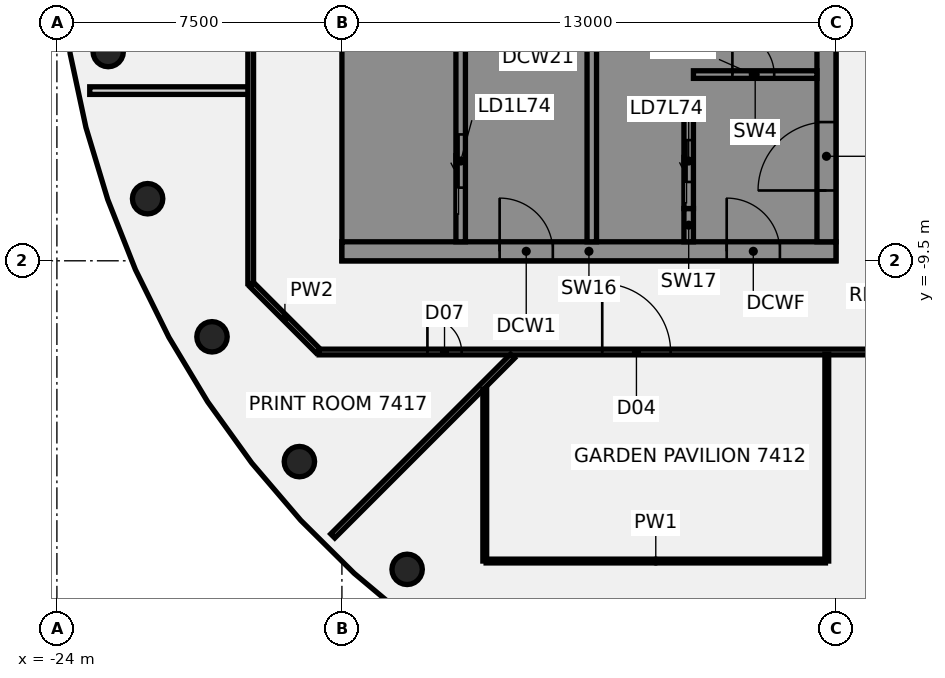
"""IFC4 building model, lengths in metres.
Left out: names, types, materials, properties, quantities, classifications, styles, units other than length and angle.
Written with IfcOpenShell. Run it as: python <this file> out.ifc"""

import sys

from ifc_helpers import new_model, si_unit, direction, frame, frame_2d, origin, origin_2d, place, context, subcontext, project, spatial, polyline, rectangle, circle, outline, extrude, element, fill, save


model = new_model("IFC4")
c1 = context("Model", 3, precision=1e-05, world=origin(), true_north=direction((0.0, 1.0)))
c2 = subcontext(c1, "Body", "Model", "MODEL_VIEW")
j1 = project(units=[si_unit("LENGTHUNIT", "METRE"), si_unit("PLANEANGLEUNIT", "RADIAN")], contexts=[c1])
p1 = place(None, origin())
s1 = spatial("IfcSite", under=j1, at=p1, CompositionType="ELEMENT")
p2 = place(p1, origin())
s2 = spatial("IfcBuilding", under=s1, at=p2, CompositionType="ELEMENT")
p3 = place(p2, frame((0.0, 0.0, 299.4)))
s3 = spatial("IfcBuildingStorey", under=s2, at=p3, CompositionType="ELEMENT", Elevation=299.4)
for number, where, z_axis, x_axis in (
    (1, (-22.651, -3.994, -0.25), (0.0, 0.0, 1.0), (1.0, 0.0, 0.0)),
    (2, (-21.613, -7.866, -0.25), (0.0, 0.0, 1.0), (1.0, 0.0, 0.0)),
    (3, (-19.919, -11.5, -0.25), (0.0, 0.0, 1.0), (1.0, 0.0, 0.0)),
    (4, (-17.619, -14.784, -0.25), (0.0, 0.0, 1.0), (1.0, 0.0, 0.0)),
    (5, (-14.784, -17.619, -0.25), (0.0, 0.0, 1.0), (1.0, 0.0, 0.0)),
):
    element("IfcColumn", number, at=place(p3, frame(where, z_axis=z_axis, x_axis=x_axis)), inside=s3, PredefinedType="COLUMN", context=c2, shape_type="SweptSolid", body=[
        extrude(circle(Radius=0.4, at=origin_2d()), origin(), (0.0, 0.0, 1.0), 6.07),
    ])
p4 = place(p3, frame((-18.872, -10.128, 0.0), z_axis=(0.0, 0.0, 1.0), x_axis=(0.707106781187, -0.707106781187, 0.0)))
e6 = element("IfcWall", 6, at=p4, inside=s3, PredefinedType="PARTITIONING", context=c2, shape_type="SweptSolid", body=[
    extrude(rectangle(XDim=2.465, YDim=0.15, at=frame_2d((1.232, 0.0))), origin(), (0.0, 0.0, 1.0), 5.02),
])
p5 = place(p3, frame((-23.136, -5.022, 0.0), z_axis=(0.0, 0.0, 1.0), x_axis=(1.0, 0.0, 0.0)))
e7 = element("IfcWall", 7, at=p5, inside=s3, PredefinedType="PARTITIONING", context=c2, shape_type="SweptSolid", body=[
    extrude(rectangle(XDim=4.181, YDim=0.2, at=frame_2d((2.09, 0.0))), origin(), (0.0, 0.0, 1.0), 5.02),
])
p6 = place(p3, frame((-17.1, -11.9, 0.0), z_axis=(0.0, 0.0, 1.0), x_axis=(1.0, 0.0, 0.0)))
e8 = element("IfcWall", 8, at=p6, inside=s3, PredefinedType="PARTITIONING", context=c2, shape_type="SweptSolid", body=[
    extrude(rectangle(XDim=34.165, YDim=0.15, at=frame_2d((17.083, 0.0))), origin(), (0.0, 0.0, 1.0), 5.02),
])
p7 = place(p6, frame((7.45, 0.0, 0.0)))
e9 = element("IfcOpeningElement", 9, at=p7, cuts=e8, PredefinedType="OPENING", context=c2, shape_type="SweptSolid", body=[
    extrude(rectangle(XDim=1.8, YDim=2.1, at=frame_2d((0.9, 1.05))), frame((0.0, 0.085, 0.0), z_axis=(0.0, -1.0, 0.0), x_axis=(1.0, 0.0, 0.0)), (0.0, 0.0, 1.0), 0.17),
])
p8 = place(p6, frame((27.541, 0.0, 0.0)))
e10 = element("IfcOpeningElement", 10, at=p8, cuts=e8, PredefinedType="OPENING", context=c2, shape_type="SweptSolid", body=[
    extrude(rectangle(XDim=0.9, YDim=2.1, at=frame_2d((0.45, 1.05))), frame((0.0, 0.085, 0.0), z_axis=(0.0, -1.0, 0.0), x_axis=(1.0, 0.0, 0.0)), (0.0, 0.0, 1.0), 0.17),
])
p9 = place(p6, frame((18.909, 0.0, 0.0)))
e11 = element("IfcOpeningElement", 11, at=p9, cuts=e8, PredefinedType="OPENING", context=c2, shape_type="SweptSolid", body=[
    extrude(rectangle(XDim=1.8, YDim=2.1, at=frame_2d((0.9, 1.05))), frame((0.0, 0.085, 0.0), z_axis=(0.0, -1.0, 0.0), x_axis=(1.0, 0.0, 0.0)), (0.0, 0.0, 1.0), 0.17),
])
p10 = place(p6, frame((2.85, 0.0, 0.0)))
e12 = element("IfcOpeningElement", 12, at=p10, cuts=e8, PredefinedType="OPENING", context=c2, shape_type="SweptSolid", body=[
    extrude(rectangle(XDim=0.9, YDim=2.1, at=frame_2d((0.45, 1.05))), frame((0.0, 0.085, 0.0), z_axis=(0.0, -1.0, 0.0), x_axis=(1.0, 0.0, 0.0)), (0.0, 0.0, 1.0), 0.17),
])
p11 = place(p3, frame((-12.706, -17.4, 0.0), z_axis=(0.0, 0.0, 1.0), x_axis=(1.0, 0.0, 0.0)))
e13 = element("IfcWall", 13, at=p11, inside=s3, PredefinedType="PARTITIONING", context=c2, shape_type="SweptSolid", body=[
    extrude(rectangle(XDim=8.93, YDim=0.1, at=frame_2d((4.465, 0.0))), origin(), (0.0, 0.0, 1.0), 5.02),
])
p12 = place(p3, frame((-16.74, -16.74, 0.0), z_axis=(0.0, 0.0, 1.0), x_axis=(0.707106781187, 0.707106781187, 0.0)))
e14 = element("IfcWall", 14, at=p12, inside=s3, PredefinedType="PARTITIONING", context=c2, shape_type="SweptSolid", body=[
    extrude(rectangle(XDim=6.691, YDim=0.15, at=frame_2d((3.345, 0.0))), origin(), (0.0, 0.0, 1.0), 5.02),
])
p13 = place(p3, frame((-18.9, -10.1, 0.0), z_axis=(0.0, 0.0, 1.0), x_axis=(0.0, 1.0, 0.0)))
e15 = element("IfcWall", 15, at=p13, inside=s3, PredefinedType="PARTITIONING", context=c2, shape_type="SweptSolid", body=[
    extrude(rectangle(XDim=20.2, YDim=0.15, at=frame_2d((10.1, 0.0))), origin(), (0.0, 0.0, 1.0), 5.02),
])
p14 = place(p13, frame((12.128, 0.0, 0.0)))
e16 = element("IfcOpeningElement", 16, at=p14, cuts=e15, PredefinedType="OPENING", context=c2, shape_type="SweptSolid", body=[
    extrude(rectangle(XDim=0.9, YDim=2.1, at=frame_2d((0.45, 1.05))), frame((0.0, 0.085, 0.0), z_axis=(0.0, -1.0, 0.0), x_axis=(1.0, 0.0, 0.0)), (0.0, 0.0, 1.0), 0.17),
])
p15 = place(p3, frame((-12.741, -17.4, 0.0), z_axis=(0.0, 0.0, 1.0), x_axis=(0.0, 1.0, 0.0)))
e17 = element("IfcWall", 17, at=p15, inside=s3, PredefinedType="PARTITIONING", context=c2, shape_type="SweptSolid", body=[
    extrude(rectangle(XDim=4.519, YDim=0.1, at=frame_2d((2.259, 0.0))), origin(), (0.0, 0.0, 1.0), 5.02),
])
p16 = place(p3, frame((-3.741, -17.4, 0.0), z_axis=(0.0, 0.0, 1.0), x_axis=(0.0, 1.0, 0.0)))
e18 = element("IfcWall", 18, at=p16, inside=s3, PredefinedType="PARTITIONING", context=c2, shape_type="SweptSolid", body=[
    extrude(rectangle(XDim=5.445, YDim=0.1, at=frame_2d((2.722, 0.0))), origin(), (0.0, 0.0, 1.0), 5.02),
])
p17 = place(p3, frame((-16.5, -9.25, 0.0), z_axis=(0.0, 0.0, 1.0), x_axis=(1.0, 0.0, 0.0)))
e19 = element("IfcWall", 19, at=p17, inside=s3, PredefinedType="SHEAR", context=c2, shape_type="SweptSolid", body=[
    extrude(rectangle(XDim=13.0, YDim=0.5, at=frame_2d((6.5, 0.0))), origin(), (0.0, 0.0, 1.0), 5.82),
])
p18 = place(p17, frame((4.15, 0.0, 0.0)))
e20 = element("IfcOpeningElement", 20, at=p18, cuts=e19, PredefinedType="OPENING", context=c2, shape_type="SweptSolid", body=[
    extrude(rectangle(XDim=1.4, YDim=2.1, at=frame_2d((0.7, 1.05))), frame((0.0, 0.26, 0.0), z_axis=(0.0, -1.0, 0.0), x_axis=(1.0, 0.0, 0.0)), (0.0, 0.0, 1.0), 0.52),
])
p19 = place(p17, frame((10.125, 0.0, 0.0)))
e21 = element("IfcOpeningElement", 21, at=p19, cuts=e19, PredefinedType="OPENING", context=c2, shape_type="SweptSolid", body=[
    extrude(rectangle(XDim=1.4, YDim=2.1, at=frame_2d((0.7, 1.05))), frame((0.0, 0.26, 0.0), z_axis=(0.0, -1.0, 0.0), x_axis=(1.0, 0.0, 0.0)), (0.0, 0.0, 1.0), 0.52),
])
p20 = place(p3, origin())
e22 = element("IfcWall", 22, at=p20, inside=s3, PredefinedType="SHEAR", context=c2, shape_type="SweptSolid", body=[
    extrude(outline(polyline([(-13.5, -8.125), (-16.0, -8.125), (-16.0, -5.625), (-13.5, -5.625), (-13.5, -5.375), (-16.0, -5.375), (-16.0, 5.375), (-13.5, 5.375), (-13.5, 5.625), (-16.0, 5.625), (-16.0, 8.125), (-13.5, 8.125), (-13.5, 9.0), (-16.0, 9.0), (-16.5, 9.0), (-16.5, -9.0), (-16.0, -9.0), (-13.5, -9.0), (-13.5, -8.125)])), origin(), (0.0, 0.0, 1.0), 5.82),
])
p21 = place(p3, origin())
e23 = element("IfcWall", 23, at=p21, inside=s3, PredefinedType="SHEAR", context=c2, shape_type="SweptSolid", body=[
    extrude(outline(polyline([(-9.8, -5.625), (-7.5, -5.625), (-7.25, -5.625), (-7.25, 9.0), (-7.5, 9.0), (-9.8, 9.0), (-9.8, 8.125), (-7.5, 8.125), (-7.5, -5.375), (-9.8, -5.375), (-9.8, -5.625)])), origin(), (0.0, 0.0, 1.0), 5.82),
])
p22 = place(p3, origin())
e24 = element("IfcWall", 24, at=p22, inside=s3, PredefinedType="SHEAR", context=c2, shape_type="SweptSolid", body=[
    extrude(outline(polyline([(-7.5, -8.125), (-9.55, -8.125), (-9.55, -5.625), (-9.8, -5.625), (-9.8, -8.125), (-9.8, -9.0), (-7.5, -9.0), (-7.5, -8.125)])), origin(), (0.0, 0.0, 1.0), 5.82),
])
p23 = place(p3, frame((-7.375, -9.0, 0.0), z_axis=(0.0, 0.0, 1.0), x_axis=(0.0, 1.0, 0.0)))
e25 = element("IfcWall", 25, at=p23, inside=s3, PredefinedType="SHEAR", context=c2, shape_type="SweptSolid", body=[
    extrude(rectangle(XDim=0.875, YDim=0.25, at=frame_2d((0.438, 0.0))), origin(), (0.0, 0.0, 1.0), 5.82),
])
p24 = place(p3, frame((-13.375, -9.0, 0.0), z_axis=(0.0, 0.0, 1.0), x_axis=(0.0, 1.0, 0.0)))
e26 = element("IfcWall", 26, at=p24, inside=s3, PredefinedType="SHEAR", context=c2, shape_type="SweptSolid", body=[
    extrude(rectangle(XDim=18.0, YDim=0.25, at=frame_2d((9.0, 0.0))), origin(), (0.0, 0.0, 1.0), 5.82),
])
p25 = place(p24, frame((1.425, 0.0, 0.0)))
e27 = element("IfcOpeningElement", 27, at=p25, cuts=e26, PredefinedType="OPENING", context=c2, shape_type="SweptSolid", body=[
    extrude(rectangle(XDim=1.4, YDim=2.1, at=frame_2d((0.7, 1.05))), frame((0.0, 0.135, 0.0), z_axis=(0.0, -1.0, 0.0), x_axis=(1.0, 0.0, 0.0)), (0.0, 0.0, 1.0), 0.27),
])
p26 = place(p24, frame((15.275, 0.0, 0.0)))
e28 = element("IfcOpeningElement", 28, at=p26, cuts=e26, PredefinedType="OPENING", context=c2, shape_type="SweptSolid", body=[
    extrude(rectangle(XDim=1.2, YDim=2.1, at=frame_2d((0.6, 1.05))), frame((0.0, 0.135, 0.0), z_axis=(0.0, -1.0, 0.0), x_axis=(1.0, 0.0, 0.0)), (0.0, 0.0, 1.0), 0.27),
])
p27 = place(p24, frame((6.646, 0.0, 0.0)))
e29 = element("IfcOpeningElement", 29, at=p27, cuts=e26, PredefinedType="OPENING", context=c2, shape_type="SweptSolid", body=[
    extrude(rectangle(XDim=1.0, YDim=2.1, at=frame_2d((0.5, 1.05))), frame((0.0, 0.135, 0.0), z_axis=(0.0, -1.0, 0.0), x_axis=(1.0, 0.0, 0.0)), (0.0, 0.0, 1.0), 0.27),
])
p28 = place(p24, frame((12.146, 0.0, 0.0)))
e30 = element("IfcOpeningElement", 30, at=p28, cuts=e26, PredefinedType="OPENING", context=c2, shape_type="SweptSolid", body=[
    extrude(rectangle(XDim=1.0, YDim=2.1, at=frame_2d((0.5, 1.05))), frame((0.0, 0.135, 0.0), z_axis=(0.0, -1.0, 0.0), x_axis=(1.0, 0.0, 0.0)), (0.0, 0.0, 1.0), 0.27),
])
p29 = place(p3, frame((-9.925, -9.0, 0.0), z_axis=(0.0, 0.0, 1.0), x_axis=(0.0, 1.0, 0.0)))
e31 = element("IfcWall", 31, at=p29, inside=s3, PredefinedType="SHEAR", context=c2, shape_type="SweptSolid", body=[
    extrude(rectangle(XDim=18.0, YDim=0.25, at=frame_2d((9.0, 0.0))), origin(), (0.0, 0.0, 1.0), 5.82),
])
p30 = place(p29, frame((5.75, 0.0, 0.0)))
e32 = element("IfcOpeningElement", 32, at=p30, cuts=e31, PredefinedType="OPENING", context=c2, shape_type="SweptSolid", body=[
    extrude(rectangle(XDim=1.0, YDim=2.1, at=frame_2d((0.5, 1.05))), frame((0.0, 0.135, 0.0), z_axis=(0.0, -1.0, 0.0), x_axis=(1.0, 0.0, 0.0)), (0.0, 0.0, 1.0), 0.27),
])
p31 = place(p29, frame((9.396, 0.0, 0.0)))
e33 = element("IfcOpeningElement", 33, at=p31, cuts=e31, PredefinedType="OPENING", context=c2, shape_type="SweptSolid", body=[
    extrude(rectangle(XDim=1.0, YDim=2.1, at=frame_2d((0.5, 1.05))), frame((0.0, 0.135, 0.0), z_axis=(0.0, -1.0, 0.0), x_axis=(1.0, 0.0, 0.0)), (0.0, 0.0, 1.0), 0.27),
])
p32 = place(p29, frame((10.771, 0.0, 0.0)))
e34 = element("IfcOpeningElement", 34, at=p32, cuts=e31, PredefinedType="OPENING", context=c2, shape_type="SweptSolid", body=[
    extrude(rectangle(XDim=1.0, YDim=2.1, at=frame_2d((0.5, 1.05))), frame((0.0, 0.135, 0.0), z_axis=(0.0, -1.0, 0.0), x_axis=(1.0, 0.0, 0.0)), (0.0, 0.0, 1.0), 0.27),
])
p33 = place(p29, frame((14.0, 0.0, 0.0)))
e35 = element("IfcOpeningElement", 35, at=p33, cuts=e31, PredefinedType="OPENING", context=c2, shape_type="SweptSolid", body=[
    extrude(rectangle(XDim=1.0, YDim=2.1, at=frame_2d((0.5, 1.05))), frame((0.0, 0.135, 0.0), z_axis=(0.0, -1.0, 0.0), x_axis=(1.0, 0.0, 0.0)), (0.0, 0.0, 1.0), 0.27),
])
p34 = place(p3, frame((-7.375, -8.125, 0.0), z_axis=(0.0, 0.0, 1.0), x_axis=(0.0, 1.0, 0.0)))
e36 = element("IfcWall", 36, at=p34, inside=s3, PredefinedType="SHEAR", context=c2, shape_type="SweptSolid", body=[
    extrude(rectangle(XDim=2.5, YDim=0.25, at=frame_2d((1.25, 0.0))), origin(), (0.0, 0.0, 1.0), 5.82),
])
p35 = place(p34, frame((0.7, 0.0, 0.0)))
e37 = element("IfcOpeningElement", 37, at=p35, cuts=e36, PredefinedType="OPENING", context=c2, shape_type="SweptSolid", body=[
    extrude(rectangle(XDim=1.1, YDim=2.1, at=frame_2d((0.55, 1.05))), frame((0.0, 0.135, 0.0), z_axis=(0.0, -1.0, 0.0), x_axis=(1.0, 0.0, 0.0)), (0.0, 0.0, 1.0), 0.27),
])
p36 = place(p3, frame((-3.75, -9.0, 0.0), z_axis=(0.0, 0.0, 1.0), x_axis=(0.0, 1.0, 0.0)))
e38 = element("IfcWall", 38, at=p36, inside=s3, PredefinedType="SHEAR", context=c2, shape_type="SweptSolid", body=[
    extrude(rectangle(XDim=18.0, YDim=0.5, at=frame_2d((9.0, 0.0))), origin(), (0.0, 0.0, 1.0), 5.82),
])
p37 = place(p36, frame((1.35, 0.0, 0.0)))
e39 = element("IfcOpeningElement", 39, at=p37, cuts=e38, PredefinedType="OPENING", context=c2, shape_type="SweptSolid", body=[
    extrude(rectangle(XDim=1.8, YDim=2.1, at=frame_2d((0.9, 1.05))), frame((0.0, 0.26, 0.0), z_axis=(0.0, -1.0, 0.0), x_axis=(1.0, 0.0, 0.0)), (0.0, 0.0, 1.0), 0.52),
])
p38 = place(p36, frame((12.478, 0.0, 0.0)))
e40 = element("IfcOpeningElement", 40, at=p38, cuts=e38, PredefinedType="OPENING", context=c2, shape_type="SweptSolid", body=[
    extrude(rectangle(XDim=1.0, YDim=2.1, at=frame_2d((0.5, 1.05))), frame((0.0, 0.26, 0.0), z_axis=(0.0, -1.0, 0.0), x_axis=(1.0, 0.0, 0.0)), (0.0, 0.0, 1.0), 0.52),
])
p39 = place(p36, frame((16.002, 0.0, 0.0)))
e41 = element("IfcOpeningElement", 41, at=p39, cuts=e38, PredefinedType="OPENING", context=c2, shape_type="SweptSolid", body=[
    extrude(rectangle(XDim=1.0, YDim=2.1, at=frame_2d((0.5, 1.05))), frame((0.0, 0.26, 0.0), z_axis=(0.0, -1.0, 0.0), x_axis=(1.0, 0.0, 0.0)), (0.0, 0.0, 1.0), 0.52),
])
p40 = place(p3, frame((-7.25, -4.6, 0.0), z_axis=(0.0, 0.0, 1.0), x_axis=(1.0, 0.0, 0.0)))
e42 = element("IfcWall", 42, at=p40, inside=s3, PredefinedType="SHEAR", context=c2, shape_type="SweptSolid", body=[
    extrude(rectangle(XDim=3.25, YDim=0.2, at=frame_2d((1.625, 0.0))), origin(), (0.0, 0.0, 1.0), 5.82),
])
p41 = place(p40, frame((1.025, 0.0, 0.0)))
e43 = element("IfcOpeningElement", 43, at=p41, cuts=e42, PredefinedType="OPENING", context=c2, shape_type="SweptSolid", body=[
    extrude(rectangle(XDim=1.1, YDim=2.1, at=frame_2d((0.55, 1.05))), frame((0.0, 0.11, 0.0), z_axis=(0.0, -1.0, 0.0), x_axis=(1.0, 0.0, 0.0)), (0.0, 0.0, 1.0), 0.22),
])
p42 = place(p7, frame((1.8, 0.0, 0.0), z_axis=(0.0, 0.0, 1.0), x_axis=(-1.0, 0.0, 0.0)))
e44 = element("IfcDoor", 44, at=p42, inside=s3, OperationType="DOUBLE_DOOR_SINGLE_SWING", PredefinedType="DOOR", context=c2, shape_type="SweptSolid", body=[
    extrude(rectangle(XDim=1.8, YDim=2.1, at=frame_2d((0.9, 1.05))), frame((0.0, 0.025, 0.0), z_axis=(0.0, -1.0, 0.0), x_axis=(1.0, 0.0, 0.0)), (0.0, 0.0, 1.0), 0.05),
])
fill(e9, e44)
p43 = place(p10, frame((0.9, 0.0, 0.0), z_axis=(0.0, 0.0, 1.0), x_axis=(-1.0, 0.0, 0.0)))
e45 = element("IfcDoor", 45, at=p43, inside=s3, OperationType="SINGLE_SWING_LEFT", PredefinedType="DOOR", context=c2, shape_type="SweptSolid", body=[
    extrude(rectangle(XDim=0.9, YDim=2.1, at=frame_2d((0.45, 1.05))), frame((0.0, 0.025, 0.0), z_axis=(0.0, -1.0, 0.0), x_axis=(1.0, 0.0, 0.0)), (0.0, 0.0, 1.0), 0.05),
])
fill(e12, e45)
p44 = place(p18, origin())
e46 = element("IfcDoor", 46, at=p44, inside=s3, OperationType="SINGLE_SWING_LEFT", PredefinedType="DOOR", context=c2, shape_type="SweptSolid", body=[
    extrude(rectangle(XDim=1.4, YDim=2.1, at=frame_2d((0.7, 1.05))), frame((0.0, 0.025, 0.0), z_axis=(0.0, -1.0, 0.0), x_axis=(1.0, 0.0, 0.0)), (0.0, 0.0, 1.0), 0.05),
])
fill(e20, e46)
p45 = place(p19, origin())
e47 = element("IfcDoor", 47, at=p45, inside=s3, OperationType="SINGLE_SWING_LEFT", PredefinedType="DOOR", context=c2, shape_type="SweptSolid", body=[
    extrude(rectangle(XDim=1.4, YDim=2.1, at=frame_2d((0.7, 1.05))), frame((0.0, 0.025, 0.0), z_axis=(0.0, -1.0, 0.0), x_axis=(1.0, 0.0, 0.0)), (0.0, 0.0, 1.0), 0.05),
])
fill(e21, e47)
p46 = place(p37, origin())
e48 = element("IfcDoor", 48, at=p46, inside=s3, OperationType="SINGLE_SWING_LEFT", PredefinedType="DOOR", context=c2, shape_type="SweptSolid", body=[
    extrude(rectangle(XDim=1.8, YDim=2.1, at=frame_2d((0.9, 1.05))), frame((0.0, 0.025, 0.0), z_axis=(0.0, -1.0, 0.0), x_axis=(1.0, 0.0, 0.0)), (0.0, 0.0, 1.0), 0.05),
])
fill(e39, e48)
p47 = place(p41, origin())
e49 = element("IfcDoor", 49, at=p47, inside=s3, OperationType="SINGLE_SWING_LEFT", PredefinedType="DOOR", context=c2, shape_type="SweptSolid", body=[
    extrude(rectangle(XDim=1.1, YDim=2.1, at=frame_2d((0.55, 1.05))), frame((0.0, 0.025, 0.0), z_axis=(0.0, -1.0, 0.0), x_axis=(1.0, 0.0, 0.0)), (0.0, 0.0, 1.0), 0.05),
])
fill(e43, e49)
p48 = place(p25, origin())
e50 = element("IfcDoor", 50, at=p48, inside=s3, OperationType="SLIDING_TO_LEFT", PredefinedType="DOOR", context=c2, shape_type="SweptSolid", body=[
    extrude(rectangle(XDim=1.4, YDim=2.1, at=frame_2d((0.7, 1.05))), frame((0.0, 0.025, 0.0), z_axis=(0.0, -1.0, 0.0), x_axis=(1.0, 0.0, 0.0)), (0.0, 0.0, 1.0), 0.05),
])
fill(e27, e50)
p49 = place(p35, origin())
e51 = element("IfcDoor", 51, at=p49, inside=s3, OperationType="SLIDING_TO_LEFT", PredefinedType="DOOR", context=c2, shape_type="SweptSolid", body=[
    extrude(rectangle(XDim=1.1, YDim=2.1, at=frame_2d((0.55, 1.05))), frame((0.0, 0.025, 0.0), z_axis=(0.0, -1.0, 0.0), x_axis=(1.0, 0.0, 0.0)), (0.0, 0.0, 1.0), 0.05),
])
fill(e37, e51)
save(model, sys.argv[1])
